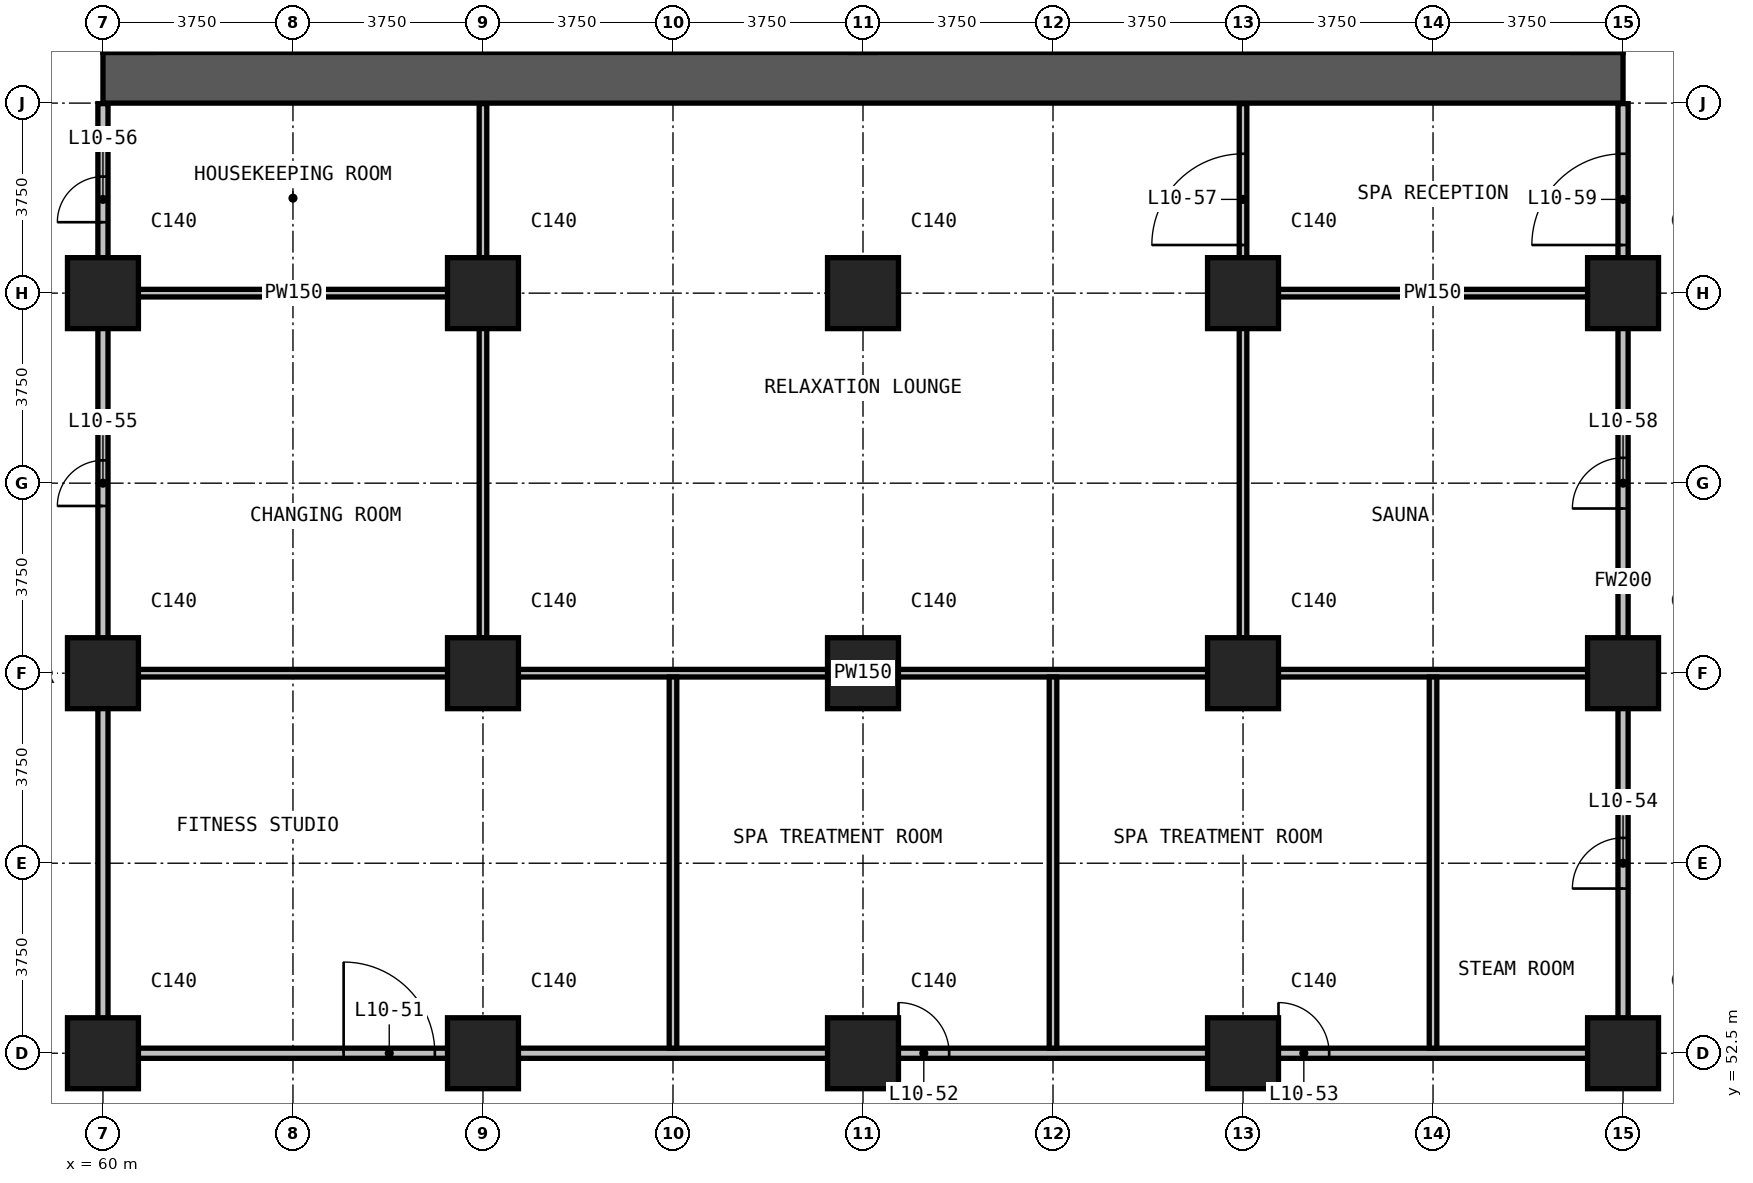
"""IFC4 building model, lengths in metres.
Left out: names, types, materials, properties, quantities, classifications, styles, units other than length and angle.
Written with IfcOpenShell. Run it as: python <this file> out.ifc"""

import sys

from ifc_helpers import new_model, si_unit, direction, frame, frame_2d, origin, origin_2d, place, context, subcontext, project, spatial, rectangle, extrude, element, fill, save


model = new_model("IFC4")
c1 = context("Model", 3, precision=1e-05, world=origin(), true_north=direction((0.0, 1.0)))
c2 = subcontext(c1, "Body", "Model", "MODEL_VIEW")
j1 = project(units=[si_unit("LENGTHUNIT", "METRE"), si_unit("PLANEANGLEUNIT", "RADIAN")], contexts=[c1])
p1 = place(None, origin())
s1 = spatial("IfcSite", under=j1, at=p1, CompositionType="ELEMENT")
p2 = place(p1, origin())
s2 = spatial("IfcBuilding", under=s1, at=p2, CompositionType="ELEMENT")
p3 = place(p2, frame((0.0, 0.0, 52.7)))
s3 = spatial("IfcBuildingStorey", under=s2, at=p3, CompositionType="ELEMENT", Elevation=52.7)
for number, where, z_axis, x_axis in (
    (1, (60.0, 52.5, 0.0), (0.0, 0.0, 1.0), (1.0, 0.0, 0.0)),
    (2, (60.0, 60.0, 0.0), (0.0, 0.0, 1.0), (1.0, 0.0, 0.0)),
    (3, (60.0, 67.5, 0.0), (0.0, 0.0, 1.0), (1.0, 0.0, 0.0)),
    (4, (67.5, 52.5, 0.0), (0.0, 0.0, 1.0), (1.0, 0.0, 0.0)),
    (5, (67.5, 60.0, 0.0), (0.0, 0.0, 1.0), (1.0, 0.0, 0.0)),
    (6, (67.5, 67.5, 0.0), (0.0, 0.0, 1.0), (1.0, 0.0, 0.0)),
    (7, (75.0, 52.5, 0.0), (0.0, 0.0, 1.0), (1.0, 0.0, 0.0)),
    (8, (75.0, 60.0, 0.0), (0.0, 0.0, 1.0), (1.0, 0.0, 0.0)),
    (9, (75.0, 67.5, 0.0), (0.0, 0.0, 1.0), (1.0, 0.0, 0.0)),
    (10, (82.5, 52.5, 0.0), (0.0, 0.0, 1.0), (1.0, 0.0, 0.0)),
    (11, (82.5, 60.0, 0.0), (0.0, 0.0, 1.0), (1.0, 0.0, 0.0)),
    (12, (82.5, 67.5, 0.0), (0.0, 0.0, 1.0), (1.0, 0.0, 0.0)),
    (13, (90.0, 52.5, 0.0), (0.0, 0.0, 1.0), (1.0, 0.0, 0.0)),
    (14, (90.0, 60.0, 0.0), (0.0, 0.0, 1.0), (1.0, 0.0, 0.0)),
    (15, (90.0, 67.5, 0.0), (0.0, 0.0, 1.0), (1.0, 0.0, 0.0)),
):
    element("IfcColumn", number, at=place(p3, frame(where, z_axis=z_axis, x_axis=x_axis)), inside=s3, PredefinedType="COLUMN", context=c2, shape_type="SweptSolid", body=[
        extrude(rectangle(XDim=1.4, YDim=1.4, at=origin_2d()), origin(), (0.0, 0.0, 1.0), 3.3),
    ])
p4 = place(p3, frame((60.0, 71.75, 0.0), z_axis=(0.0, 0.0, 1.0), x_axis=(1.0, 0.0, 0.0)))
e16 = element("IfcWall", 16, at=p4, inside=s3, PredefinedType="SHEAR", context=c2, shape_type="SweptSolid", body=[
    extrude(rectangle(XDim=30.0, YDim=1.0, at=frame_2d((15.0, 0.0))), origin(), (0.0, 0.0, 1.0), 3.3),
])
p5 = place(p3, frame((60.1, 52.5, 0.0), z_axis=(0.0, 0.0, 1.0), x_axis=(1.0, 0.0, 0.0)))
e17 = element("IfcWall", 17, at=p5, inside=s3, PredefinedType="PARTITIONING", context=c2, shape_type="SweptSolid", body=[
    extrude(rectangle(XDim=29.8, YDim=0.2, at=frame_2d((14.9, 0.0))), origin(), (0.0, 0.0, 1.0), 3.0),
])
p6 = place(p5, frame((4.65, 0.0, 0.0)))
e18 = element("IfcOpeningElement", 18, at=p6, cuts=e17, PredefinedType="OPENING", context=c2, shape_type="SweptSolid", body=[
    extrude(rectangle(XDim=1.8, YDim=2.2, at=frame_2d((0.9, 1.1))), frame((0.0, 0.11, 0.0), z_axis=(0.0, -1.0, 0.0), x_axis=(1.0, 0.0, 0.0)), (0.0, 0.0, 1.0), 0.22),
])
p7 = place(p5, frame((15.6, 0.0, 0.0)))
e19 = element("IfcOpeningElement", 19, at=p7, cuts=e17, PredefinedType="OPENING", context=c2, shape_type="SweptSolid", body=[
    extrude(rectangle(XDim=1.0, YDim=2.2, at=frame_2d((0.5, 1.1))), frame((0.0, 0.11, 0.0), z_axis=(0.0, -1.0, 0.0), x_axis=(1.0, 0.0, 0.0)), (0.0, 0.0, 1.0), 0.22),
])
p8 = place(p5, frame((23.1, 0.0, 0.0)))
e20 = element("IfcOpeningElement", 20, at=p8, cuts=e17, PredefinedType="OPENING", context=c2, shape_type="SweptSolid", body=[
    extrude(rectangle(XDim=1.0, YDim=2.2, at=frame_2d((0.5, 1.1))), frame((0.0, 0.11, 0.0), z_axis=(0.0, -1.0, 0.0), x_axis=(1.0, 0.0, 0.0)), (0.0, 0.0, 1.0), 0.22),
])
p9 = place(p3, frame((60.0, 52.4, 0.0), z_axis=(0.0, 0.0, 1.0), x_axis=(0.0, 1.0, 0.0)))
e21 = element("IfcWall", 21, at=p9, inside=s3, PredefinedType="PARTITIONING", context=c2, shape_type="SweptSolid", body=[
    extrude(rectangle(XDim=18.84, YDim=0.2, at=frame_2d((9.42, 0.0))), origin(), (0.0, 0.0, 1.0), 3.0),
])
p10 = place(p9, frame((10.9, 0.0, 0.0)))
e22 = element("IfcOpeningElement", 22, at=p10, cuts=e21, PredefinedType="OPENING", context=c2, shape_type="SweptSolid", body=[
    extrude(rectangle(XDim=0.9, YDim=2.2, at=frame_2d((0.45, 1.1))), frame((0.0, 0.11, 0.0), z_axis=(0.0, -1.0, 0.0), x_axis=(1.0, 0.0, 0.0)), (0.0, 0.0, 1.0), 0.22),
])
p11 = place(p9, frame((16.5, 0.0, 0.0)))
e23 = element("IfcOpeningElement", 23, at=p11, cuts=e21, PredefinedType="OPENING", context=c2, shape_type="SweptSolid", body=[
    extrude(rectangle(XDim=0.9, YDim=2.2, at=frame_2d((0.45, 1.1))), frame((0.0, 0.11, 0.0), z_axis=(0.0, -1.0, 0.0), x_axis=(1.0, 0.0, 0.0)), (0.0, 0.0, 1.0), 0.22),
])
p12 = place(p3, frame((90.0, 52.4, 0.0), z_axis=(0.0, 0.0, 1.0), x_axis=(0.0, 1.0, 0.0)))
e24 = element("IfcWall", 24, at=p12, inside=s3, PredefinedType="PARTITIONING", context=c2, shape_type="SweptSolid", body=[
    extrude(rectangle(XDim=18.84, YDim=0.2, at=frame_2d((9.42, 0.0))), origin(), (0.0, 0.0, 1.0), 3.0),
])
p13 = place(p12, frame((3.35, 0.0, 0.0)))
e25 = element("IfcOpeningElement", 25, at=p13, cuts=e24, PredefinedType="OPENING", context=c2, shape_type="SweptSolid", body=[
    extrude(rectangle(XDim=1.0, YDim=2.2, at=frame_2d((0.5, 1.1))), frame((0.0, 0.11, 0.0), z_axis=(0.0, -1.0, 0.0), x_axis=(1.0, 0.0, 0.0)), (0.0, 0.0, 1.0), 0.22),
])
p14 = place(p12, frame((10.85, 0.0, 0.0)))
e26 = element("IfcOpeningElement", 26, at=p14, cuts=e24, PredefinedType="OPENING", context=c2, shape_type="SweptSolid", body=[
    extrude(rectangle(XDim=1.0, YDim=2.2, at=frame_2d((0.5, 1.1))), frame((0.0, 0.11, 0.0), z_axis=(0.0, -1.0, 0.0), x_axis=(1.0, 0.0, 0.0)), (0.0, 0.0, 1.0), 0.22),
])
p15 = place(p12, frame((16.05, 0.0, 0.0)))
e27 = element("IfcOpeningElement", 27, at=p15, cuts=e24, PredefinedType="OPENING", context=c2, shape_type="SweptSolid", body=[
    extrude(rectangle(XDim=1.8, YDim=2.2, at=frame_2d((0.9, 1.1))), frame((0.0, 0.11, 0.0), z_axis=(0.0, -1.0, 0.0), x_axis=(1.0, 0.0, 0.0)), (0.0, 0.0, 1.0), 0.22),
])
p16 = place(p3, frame((60.1, 60.0, 0.0), z_axis=(0.0, 0.0, 1.0), x_axis=(1.0, 0.0, 0.0)))
e28 = element("IfcWall", 28, at=p16, inside=s3, PredefinedType="PARTITIONING", context=c2, shape_type="SweptSolid", body=[
    extrude(rectangle(XDim=29.8, YDim=0.15, at=frame_2d((14.9, 0.0))), origin(), (0.0, 0.0, 1.0), 3.0),
])
for number, where, z_axis, x_axis in (
    (29, (60.1, 67.5, 0.0), (0.0, 0.0, 1.0), (1.0, 0.0, 0.0)),
    (30, (82.575, 67.5, 0.0), (0.0, 0.0, 1.0), (1.0, 0.0, 0.0)),
):
    element("IfcWall", number, at=place(p3, frame(where, z_axis=z_axis, x_axis=x_axis)), inside=s3, PredefinedType="PARTITIONING", context=c2, shape_type="SweptSolid", body=[
        extrude(rectangle(XDim=7.325, YDim=0.15, at=frame_2d((3.663, 0.0))), origin(), (0.0, 0.0, 1.0), 3.0),
    ])
p17 = place(p3, frame((67.5, 60.075, 0.0), z_axis=(0.0, 0.0, 1.0), x_axis=(0.0, 1.0, 0.0)))
e31 = element("IfcWall", 31, at=p17, inside=s3, PredefinedType="PARTITIONING", context=c2, shape_type="SweptSolid", body=[
    extrude(rectangle(XDim=11.165, YDim=0.15, at=frame_2d((5.583, 0.0))), origin(), (0.0, 0.0, 1.0), 3.0),
])
for number, where, z_axis, x_axis in (
    (32, (71.25, 52.6, 0.0), (0.0, 0.0, 1.0), (0.0, 1.0, 0.0)),
    (33, (78.75, 52.6, 0.0), (0.0, 0.0, 1.0), (0.0, 1.0, 0.0)),
):
    element("IfcWall", number, at=place(p3, frame(where, z_axis=z_axis, x_axis=x_axis)), inside=s3, PredefinedType="PARTITIONING", context=c2, shape_type="SweptSolid", body=[
        extrude(rectangle(XDim=7.325, YDim=0.15, at=frame_2d((3.663, 0.0))), origin(), (0.0, 0.0, 1.0), 3.0),
    ])
p18 = place(p3, frame((82.5, 60.075, 0.0), z_axis=(0.0, 0.0, 1.0), x_axis=(0.0, 1.0, 0.0)))
e34 = element("IfcWall", 34, at=p18, inside=s3, PredefinedType="PARTITIONING", context=c2, shape_type="SweptSolid", body=[
    extrude(rectangle(XDim=11.165, YDim=0.15, at=frame_2d((5.583, 0.0))), origin(), (0.0, 0.0, 1.0), 3.0),
])
p19 = place(p18, frame((8.375, 0.0, 0.0)))
e35 = element("IfcOpeningElement", 35, at=p19, cuts=e34, PredefinedType="OPENING", context=c2, shape_type="SweptSolid", body=[
    extrude(rectangle(XDim=1.8, YDim=2.2, at=frame_2d((0.9, 1.1))), frame((0.0, 0.085, 0.0), z_axis=(0.0, -1.0, 0.0), x_axis=(1.0, 0.0, 0.0)), (0.0, 0.0, 1.0), 0.17),
])
p20 = place(p3, frame((86.25, 52.6, 0.0), z_axis=(0.0, 0.0, 1.0), x_axis=(0.0, 1.0, 0.0)))
e36 = element("IfcWall", 36, at=p20, inside=s3, PredefinedType="PARTITIONING", context=c2, shape_type="SweptSolid", body=[
    extrude(rectangle(XDim=7.325, YDim=0.15, at=frame_2d((3.663, 0.0))), origin(), (0.0, 0.0, 1.0), 3.0),
])
p21 = place(p6, origin())
e37 = element("IfcDoor", 37, at=p21, inside=s3, OperationType="DOUBLE_DOOR_SINGLE_SWING", PredefinedType="DOOR", context=c2, shape_type="SweptSolid", body=[
    extrude(rectangle(XDim=1.8, YDim=2.2, at=frame_2d((0.9, 1.1))), frame((0.0, 0.025, 0.0), z_axis=(0.0, -1.0, 0.0), x_axis=(1.0, 0.0, 0.0)), (0.0, 0.0, 1.0), 0.05),
])
fill(e18, e37)
p22 = place(p7, origin())
e38 = element("IfcDoor", 38, at=p22, inside=s3, OperationType="SINGLE_SWING_LEFT", PredefinedType="DOOR", context=c2, shape_type="SweptSolid", body=[
    extrude(rectangle(XDim=1.0, YDim=2.2, at=frame_2d((0.5, 1.1))), frame((0.0, 0.025, 0.0), z_axis=(0.0, -1.0, 0.0), x_axis=(1.0, 0.0, 0.0)), (0.0, 0.0, 1.0), 0.05),
])
fill(e19, e38)
p23 = place(p8, origin())
e39 = element("IfcDoor", 39, at=p23, inside=s3, OperationType="SINGLE_SWING_LEFT", PredefinedType="DOOR", context=c2, shape_type="SweptSolid", body=[
    extrude(rectangle(XDim=1.0, YDim=2.2, at=frame_2d((0.5, 1.1))), frame((0.0, 0.025, 0.0), z_axis=(0.0, -1.0, 0.0), x_axis=(1.0, 0.0, 0.0)), (0.0, 0.0, 1.0), 0.05),
])
fill(e20, e39)
p24 = place(p13, origin())
e40 = element("IfcDoor", 40, at=p24, inside=s3, OperationType="SINGLE_SWING_RIGHT", PredefinedType="DOOR", context=c2, shape_type="SweptSolid", body=[
    extrude(rectangle(XDim=1.0, YDim=2.2, at=frame_2d((0.5, 1.1))), frame((0.0, 0.025, 0.0), z_axis=(0.0, -1.0, 0.0), x_axis=(1.0, 0.0, 0.0)), (0.0, 0.0, 1.0), 0.05),
])
fill(e25, e40)
p25 = place(p10, origin())
e41 = element("IfcDoor", 41, at=p25, inside=s3, OperationType="SINGLE_SWING_LEFT", PredefinedType="DOOR", context=c2, shape_type="SweptSolid", body=[
    extrude(rectangle(XDim=0.9, YDim=2.2, at=frame_2d((0.45, 1.1))), frame((0.0, 0.025, 0.0), z_axis=(0.0, -1.0, 0.0), x_axis=(1.0, 0.0, 0.0)), (0.0, 0.0, 1.0), 0.05),
])
fill(e22, e41)
p26 = place(p11, origin())
e42 = element("IfcDoor", 42, at=p26, inside=s3, OperationType="SINGLE_SWING_RIGHT", PredefinedType="DOOR", context=c2, shape_type="SweptSolid", body=[
    extrude(rectangle(XDim=0.9, YDim=2.2, at=frame_2d((0.45, 1.1))), frame((0.0, 0.025, 0.0), z_axis=(0.0, -1.0, 0.0), x_axis=(1.0, 0.0, 0.0)), (0.0, 0.0, 1.0), 0.05),
])
fill(e23, e42)
p27 = place(p19, origin())
e43 = element("IfcDoor", 43, at=p27, inside=s3, OperationType="DOUBLE_DOOR_SINGLE_SWING", PredefinedType="DOOR", context=c2, shape_type="SweptSolid", body=[
    extrude(rectangle(XDim=1.8, YDim=2.2, at=frame_2d((0.9, 1.1))), frame((0.0, 0.025, 0.0), z_axis=(0.0, -1.0, 0.0), x_axis=(1.0, 0.0, 0.0)), (0.0, 0.0, 1.0), 0.05),
])
fill(e35, e43)
p28 = place(p14, origin())
e44 = element("IfcDoor", 44, at=p28, inside=s3, OperationType="SINGLE_SWING_RIGHT", PredefinedType="DOOR", context=c2, shape_type="SweptSolid", body=[
    extrude(rectangle(XDim=1.0, YDim=2.2, at=frame_2d((0.5, 1.1))), frame((0.0, 0.025, 0.0), z_axis=(0.0, -1.0, 0.0), x_axis=(1.0, 0.0, 0.0)), (0.0, 0.0, 1.0), 0.05),
])
fill(e26, e44)
p29 = place(p15, origin())
e45 = element("IfcDoor", 45, at=p29, inside=s3, OperationType="DOUBLE_DOOR_SINGLE_SWING", PredefinedType="DOOR", context=c2, shape_type="SweptSolid", body=[
    extrude(rectangle(XDim=1.8, YDim=2.2, at=frame_2d((0.9, 1.1))), frame((0.0, 0.025, 0.0), z_axis=(0.0, -1.0, 0.0), x_axis=(1.0, 0.0, 0.0)), (0.0, 0.0, 1.0), 0.05),
])
fill(e27, e45)
save(model, sys.argv[1])
